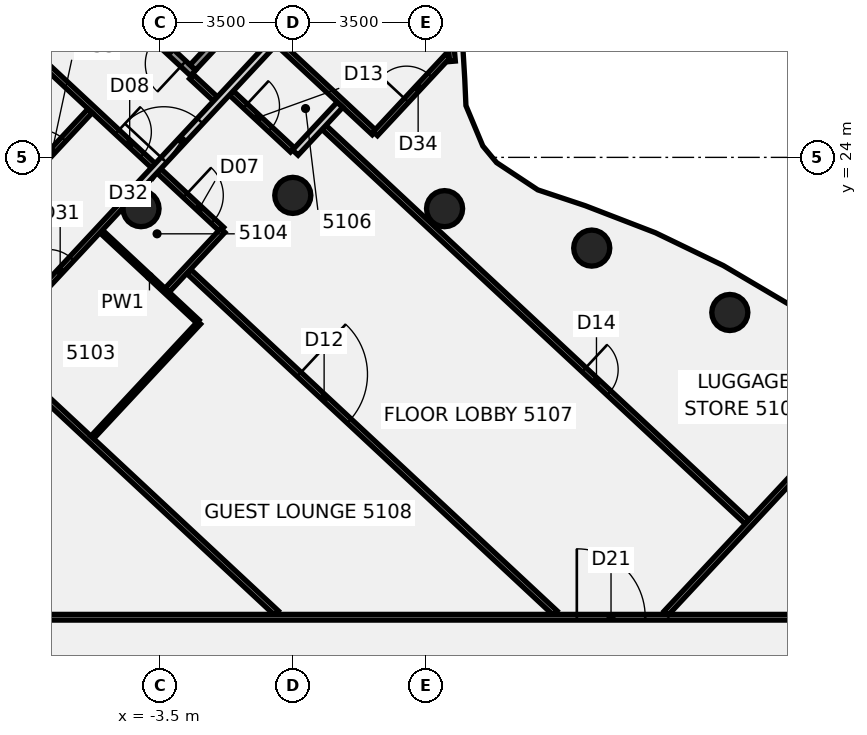
"""IFC4 building model, lengths in metres.
Left out: names, types, materials, properties, quantities, classifications, styles, units other than length and angle.
Written with IfcOpenShell. Run it as: python <this file> out.ifc"""

import sys

from ifc_helpers import new_model, si_unit, direction, frame, frame_2d, origin, origin_2d, place, context, subcontext, project, spatial, rectangle, circle, extrude, element, fill, save


model = new_model("IFC4")
c1 = context("Model", 3, precision=1e-05, world=origin(), true_north=direction((0.0, 1.0)))
c2 = subcontext(c1, "Body", "Model", "MODEL_VIEW")
j1 = project(units=[si_unit("LENGTHUNIT", "METRE"), si_unit("PLANEANGLEUNIT", "RADIAN")], contexts=[c1])
p1 = place(None, origin())
s1 = spatial("IfcSite", under=j1, at=p1, CompositionType="ELEMENT")
p2 = place(p1, origin())
s2 = spatial("IfcBuilding", under=s1, at=p2, CompositionType="ELEMENT")
p3 = place(p2, frame((0.0, 0.0, 204.1)))
s3 = spatial("IfcBuildingStorey", under=s2, at=p3, CompositionType="ELEMENT", Elevation=204.1)
for number, where, z_axis, x_axis in (
    (1, (11.5, 19.919, -0.14), (0.0, 0.0, 1.0), (1.0, 0.0, 0.0)),
    (2, (7.866, 21.613, -0.14), (0.0, 0.0, 1.0), (1.0, 0.0, 0.0)),
    (3, (3.994, 22.651, -0.14), (0.0, 0.0, 1.0), (1.0, 0.0, 0.0)),
    (4, (0.0, 23.0, -0.14), (0.0, 0.0, 1.0), (1.0, 0.0, 0.0)),
    (5, (-3.994, 22.651, -0.14), (0.0, 0.0, 1.0), (1.0, 0.0, 0.0)),
):
    element("IfcColumn", number, at=place(p3, frame(where, z_axis=z_axis, x_axis=x_axis)), inside=s3, PredefinedType="COLUMN", context=c2, shape_type="SweptSolid", body=[
        extrude(circle(Radius=0.475, at=origin_2d()), origin(), (0.0, 0.0, 1.0), 3.6),
    ])
p4 = place(p3, frame((-11.882, 22.685, 0.0), z_axis=(0.0, 0.0, 1.0), x_axis=(0.731545196646, -0.681792948969, 0.0)))
e6 = element("IfcWall", 6, at=p4, inside=s3, PredefinedType="PARTITIONING", context=c2, shape_type="SweptSolid", body=[
    extrude(rectangle(XDim=15.654, YDim=0.15, at=frame_2d((7.827, 0.0))), origin(), (0.0, 0.0, 1.0), 2.864),
])
p5 = place(p3, frame((-10.124, 29.794, 0.0), z_axis=(0.0, 0.0, 1.0), x_axis=(0.7316631589, -0.681666356738, 0.0)))
e7 = element("IfcWall", 7, at=p5, inside=s3, PredefinedType="PARTITIONING", context=c2, shape_type="SweptSolid", body=[
    extrude(rectangle(XDim=11.28, YDim=0.15, at=frame_2d((5.64, 0.0))), origin(), (0.0, 0.0, 1.0), 2.864),
])
p6 = place(p5, frame((9.97, 0.0, 0.0)))
e8 = element("IfcOpeningElement", 8, at=p6, cuts=e7, PredefinedType="OPENING", context=c2, shape_type="SweptSolid", body=[
    extrude(rectangle(XDim=1.0, YDim=2.1, at=frame_2d((0.5, 1.05))), frame((0.0, 0.085, 0.0), z_axis=(0.0, -1.0, 0.0), x_axis=(1.0, 0.0, 0.0)), (0.0, 0.0, 1.0), 0.17),
])
p7 = place(p5, frame((7.52, 0.0, 0.0)))
e9 = element("IfcOpeningElement", 9, at=p7, cuts=e7, PredefinedType="OPENING", context=c2, shape_type="SweptSolid", body=[
    extrude(rectangle(XDim=0.9, YDim=2.1, at=frame_2d((0.45, 1.05))), frame((0.0, 0.085, 0.0), z_axis=(0.0, -1.0, 0.0), x_axis=(1.0, 0.0, 0.0)), (0.0, 0.0, 1.0), 0.17),
])
p8 = place(p5, frame((0.82, 0.0, 0.0)))
e10 = element("IfcOpeningElement", 10, at=p8, cuts=e7, PredefinedType="OPENING", context=c2, shape_type="SweptSolid", body=[
    extrude(rectangle(XDim=0.9, YDim=2.1, at=frame_2d((0.45, 1.05))), frame((0.0, 0.085, 0.0), z_axis=(0.0, -1.0, 0.0), x_axis=(1.0, 0.0, 0.0)), (0.0, 0.0, 1.0), 0.17),
])
p9 = place(p3, frame((-2.664, 26.123, 0.0), z_axis=(0.0, 0.0, 1.0), x_axis=(0.731385767523, -0.68196397197, 0.0)))
e11 = element("IfcWall", 11, at=p9, inside=s3, PredefinedType="PARTITIONING", context=c2, shape_type="SweptSolid", body=[
    extrude(rectangle(XDim=0.86, YDim=0.15, at=frame_2d((0.43, 0.0))), origin(), (0.0, 0.0, 1.0), 2.864),
])
p10 = place(p3, frame((-5.043, 22.053, 0.0), z_axis=(0.0, 0.0, 1.0), x_axis=(0.731533911218, -0.681805057724, 0.0)))
e12 = element("IfcWall", 12, at=p10, inside=s3, PredefinedType="PARTITIONING", context=c2, shape_type="SweptSolid", body=[
    extrude(rectangle(XDim=3.476, YDim=0.1, at=frame_2d((1.738, 0.0))), origin(), (0.0, 0.0, 1.0), 2.864),
])
p11 = place(p3, frame((-2.739, 20.998, 0.0), z_axis=(0.0, 0.0, 1.0), x_axis=(0.731582971987, -0.681752414809, 0.0)))
e13 = element("IfcWall", 13, at=p11, inside=s3, PredefinedType="PARTITIONING", context=c2, shape_type="SweptSolid", body=[
    extrude(rectangle(XDim=13.179, YDim=0.15, at=frame_2d((6.59, 0.0))), origin(), (0.0, 0.0, 1.0), 2.864),
])
p12 = place(p11, frame((3.97, 0.0, 0.0)))
e14 = element("IfcOpeningElement", 14, at=p12, cuts=e13, PredefinedType="OPENING", context=c2, shape_type="SweptSolid", body=[
    extrude(rectangle(XDim=1.8, YDim=2.1, at=frame_2d((0.9, 1.05))), frame((0.0, 0.085, 0.0), z_axis=(0.0, -1.0, 0.0), x_axis=(1.0, 0.0, 0.0)), (0.0, 0.0, 1.0), 0.17),
])
p13 = place(p3, frame((-1.616, 25.693, 0.0), z_axis=(0.0, 0.0, 1.0), x_axis=(0.731635696516, -0.68169583216, 0.0)))
e15 = element("IfcWall", 15, at=p13, inside=s3, PredefinedType="PARTITIONING", context=c2, shape_type="SweptSolid", body=[
    extrude(rectangle(XDim=2.195, YDim=0.15, at=frame_2d((1.098, 0.0))), origin(), (0.0, 0.0, 1.0), 2.864),
])
p14 = place(p13, frame((0.5, 0.0, 0.0)))
e16 = element("IfcOpeningElement", 16, at=p14, cuts=e15, PredefinedType="OPENING", context=c2, shape_type="SweptSolid", body=[
    extrude(rectangle(XDim=0.9, YDim=2.1, at=frame_2d((0.45, 1.05))), frame((0.0, 0.085, 0.0), z_axis=(0.0, -1.0, 0.0), x_axis=(1.0, 0.0, 0.0)), (0.0, 0.0, 1.0), 0.17),
])
p15 = place(p3, frame((-0.389, 27.01, 0.0), z_axis=(0.0, 0.0, 1.0), x_axis=(0.731679144548, -0.681649198219, 0.0)))
e17 = element("IfcWall", 17, at=p15, inside=s3, PredefinedType="PARTITIONING", context=c2, shape_type="SweptSolid", body=[
    extrude(rectangle(XDim=3.46, YDim=0.15, at=frame_2d((1.73, 0.0))), origin(), (0.0, 0.0, 1.0), 2.864),
])
p16 = place(p3, frame((0.822, 24.789, 0.0), z_axis=(0.0, 0.0, 1.0), x_axis=(0.731510126667, -0.681830576158, 0.0)))
e18 = element("IfcWall", 18, at=p16, inside=s3, PredefinedType="PARTITIONING", context=c2, shape_type="SweptSolid", body=[
    extrude(rectangle(XDim=15.22, YDim=0.15, at=frame_2d((7.61, 0.0))), origin(), (0.0, 0.0, 1.0), 2.864),
])
p17 = place(p16, frame((9.35, 0.0, 0.0)))
e19 = element("IfcOpeningElement", 19, at=p17, cuts=e18, PredefinedType="OPENING", context=c2, shape_type="SweptSolid", body=[
    extrude(rectangle(XDim=0.9, YDim=2.1, at=frame_2d((0.45, 1.05))), frame((0.0, 0.085, 0.0), z_axis=(0.0, -1.0, 0.0), x_axis=(1.0, 0.0, 0.0)), (0.0, 0.0, 1.0), 0.17),
])
p18 = place(p3, frame((-17.065, 11.9, 0.0), z_axis=(0.0, 0.0, 1.0), x_axis=(1.0, 0.0, 0.0)))
e20 = element("IfcWall", 20, at=p18, inside=s3, PredefinedType="PARTITIONING", context=c2, shape_type="SweptSolid", body=[
    extrude(rectangle(XDim=34.165, YDim=0.15, at=frame_2d((17.083, 0.0))), origin(), (0.0, 0.0, 1.0), 2.864),
])
p19 = place(p18, frame((24.539, 0.0, 0.0)))
e21 = element("IfcOpeningElement", 21, at=p19, cuts=e20, PredefinedType="OPENING", context=c2, shape_type="SweptSolid", body=[
    extrude(rectangle(XDim=1.8, YDim=2.1, at=frame_2d((0.9, 1.05))), frame((0.0, 0.085, 0.0), z_axis=(0.0, -1.0, 0.0), x_axis=(1.0, 0.0, 0.0)), (0.0, 0.0, 1.0), 0.17),
])
p20 = place(p18, frame((8.831, 0.0, 0.0)))
e22 = element("IfcOpeningElement", 22, at=p20, cuts=e20, PredefinedType="OPENING", context=c2, shape_type="SweptSolid", body=[
    extrude(rectangle(XDim=1.8, YDim=2.1, at=frame_2d((0.9, 1.05))), frame((0.0, 0.085, 0.0), z_axis=(0.0, -1.0, 0.0), x_axis=(1.0, 0.0, 0.0)), (0.0, 0.0, 1.0), 0.17),
])
p21 = place(p18, frame((3.131, 0.0, 0.0)))
e23 = element("IfcOpeningElement", 23, at=p21, cuts=e20, PredefinedType="OPENING", context=c2, shape_type="SweptSolid", body=[
    extrude(rectangle(XDim=1.8, YDim=2.1, at=frame_2d((0.9, 1.05))), frame((0.0, 0.085, 0.0), z_axis=(0.0, -1.0, 0.0), x_axis=(1.0, 0.0, 0.0)), (0.0, 0.0, 1.0), 0.17),
])
p22 = place(p3, frame((-13.955, 25.8, 0.0), z_axis=(0.0, 0.0, 1.0), x_axis=(0.681742400868, 0.731592303717, 0.0)))
e24 = element("IfcWall", 24, at=p22, inside=s3, PredefinedType="PARTITIONING", context=c2, shape_type="SweptSolid", body=[
    extrude(rectangle(XDim=13.434, YDim=0.15, at=frame_2d((6.717, 0.0))), origin(), (0.0, 0.0, 1.0), 2.864),
])
p23 = place(p22, frame((5.835, 0.0, 0.0)))
e25 = element("IfcOpeningElement", 25, at=p23, cuts=e24, PredefinedType="OPENING", context=c2, shape_type="SweptSolid", body=[
    extrude(rectangle(XDim=1.8, YDim=2.1, at=frame_2d((0.9, 1.05))), frame((0.0, 0.085, 0.0), z_axis=(0.0, -1.0, 0.0), x_axis=(1.0, 0.0, 0.0)), (0.0, 0.0, 1.0), 0.17),
])
p24 = place(p3, frame((-7.907, 19.09, 0.0), z_axis=(0.0, 0.0, 1.0), x_axis=(0.681793812983, 0.731544391393, 0.0)))
e26 = element("IfcWall", 26, at=p24, inside=s3, PredefinedType="PARTITIONING", context=c2, shape_type="SweptSolid", body=[
    extrude(rectangle(XDim=5.094, YDim=0.15, at=frame_2d((2.547, 0.0))), origin(), (0.0, 0.0, 1.0), 2.864),
])
p25 = place(p24, frame((2.17, 0.0, 0.0)))
e27 = element("IfcOpeningElement", 27, at=p25, cuts=e26, PredefinedType="OPENING", context=c2, shape_type="SweptSolid", body=[
    extrude(rectangle(XDim=0.9, YDim=2.1, at=frame_2d((0.45, 1.05))), frame((0.0, 0.085, 0.0), z_axis=(0.0, -1.0, 0.0), x_axis=(1.0, 0.0, 0.0)), (0.0, 0.0, 1.0), 0.17),
])
p26 = place(p3, frame((-4.184, 23.085, 0.0), z_axis=(0.0, 0.0, 1.0), x_axis=(0.68178968738, 0.731548236402, 0.0)))
e28 = element("IfcWall", 28, at=p26, inside=s3, PredefinedType="PARTITIONING", context=c2, shape_type="SweptSolid", body=[
    extrude(rectangle(XDim=8.758, YDim=0.2, at=frame_2d((4.379, 0.0))), origin(), (0.0, 0.0, 1.0), 2.864),
])
p27 = place(p26, frame((1.159, 0.0, 0.0)))
e29 = element("IfcOpeningElement", 29, at=p27, cuts=e28, PredefinedType="OPENING", context=c2, shape_type="SweptSolid", body=[
    extrude(rectangle(XDim=1.4, YDim=2.1, at=frame_2d((0.7, 1.05))), frame((0.0, 0.11, 0.0), z_axis=(0.0, -1.0, 0.0), x_axis=(1.0, 0.0, 0.0)), (0.0, 0.0, 1.0), 0.22),
])
p28 = place(p3, frame((-7.053, 23.379, 0.0), z_axis=(0.0, 0.0, 1.0), x_axis=(0.68166548211, 0.731663973761, 0.0)))
e30 = element("IfcWall", 30, at=p28, inside=s3, PredefinedType="PARTITIONING", context=c2, shape_type="SweptSolid", body=[
    extrude(rectangle(XDim=2.52, YDim=0.15, at=frame_2d((1.26, 0.0))), origin(), (0.0, 0.0, 1.0), 2.864),
])
p29 = place(p28, frame((0.6, 0.0, 0.0)))
e31 = element("IfcOpeningElement", 31, at=p29, cuts=e30, PredefinedType="OPENING", context=c2, shape_type="SweptSolid", body=[
    extrude(rectangle(XDim=0.9, YDim=2.1, at=frame_2d((0.45, 1.05))), frame((0.0, 0.085, 0.0), z_axis=(0.0, -1.0, 0.0), x_axis=(1.0, 0.0, 0.0)), (0.0, 0.0, 1.0), 0.17),
])
p30 = place(p3, frame((-5.277, 16.632, 0.0), z_axis=(0.0, 0.0, 1.0), x_axis=(0.681902700844, 0.731442893589, 0.0)))
e32 = element("IfcWall", 32, at=p30, inside=s3, PredefinedType="PARTITIONING", context=c2, shape_type="SweptSolid", body=[
    extrude(rectangle(XDim=4.125, YDim=0.1, at=frame_2d((2.062, 0.0))), origin(), (0.0, 0.0, 1.0), 2.864),
])
p31 = place(p3, frame((2.173, 24.623, 0.0), z_axis=(0.0, 0.0, 1.0), x_axis=(0.681904871808, 0.731440869657, 0.0)))
e33 = element("IfcWall", 33, at=p31, inside=s3, PredefinedType="PARTITIONING", context=c2, shape_type="SweptSolid", body=[
    extrude(rectangle(XDim=2.799, YDim=0.15, at=frame_2d((1.4, 0.0))), origin(), (0.0, 0.0, 1.0), 2.864),
])
p32 = place(p31, frame((1.2, 0.0, 0.0)))
e34 = element("IfcOpeningElement", 34, at=p32, cuts=e33, PredefinedType="OPENING", context=c2, shape_type="SweptSolid", body=[
    extrude(rectangle(XDim=0.9, YDim=2.1, at=frame_2d((0.45, 1.05))), frame((0.0, 0.085, 0.0), z_axis=(0.0, -1.0, 0.0), x_axis=(1.0, 0.0, 0.0)), (0.0, 0.0, 1.0), 0.17),
])
p33 = place(p3, frame((-3.301, 20.511, 0.0), z_axis=(0.0, 0.0, 1.0), x_axis=(0.681683968941, 0.731646749797, 0.0)))
e35 = element("IfcWall", 35, at=p33, inside=s3, PredefinedType="PARTITIONING", context=c2, shape_type="SweptSolid", body=[
    extrude(rectangle(XDim=2.14, YDim=0.15, at=frame_2d((1.07, 0.0))), origin(), (0.0, 0.0, 1.0), 2.864),
])
p34 = place(p3, frame((0.066, 24.125, 0.0), z_axis=(0.0, 0.0, 1.0), x_axis=(0.681609901537, 0.731715752275, 0.0)))
e36 = element("IfcWall", 36, at=p34, inside=s3, PredefinedType="PARTITIONING", context=c2, shape_type="SweptSolid", body=[
    extrude(rectangle(XDim=1.72, YDim=0.2, at=frame_2d((0.86, 0.0))), origin(), (0.0, 0.0, 1.0), 2.864),
])
p35 = place(p3, frame((9.826, 12.01, 0.0), z_axis=(0.0, 0.0, 1.0), x_axis=(0.681799231756, 0.7315393411, 0.0)))
e37 = element("IfcWall", 37, at=p35, inside=s3, PredefinedType="PARTITIONING", context=c2, shape_type="SweptSolid", body=[
    extrude(rectangle(XDim=7.058, YDim=0.15, at=frame_2d((3.529, 0.0))), origin(), (0.0, 0.0, 1.0), 2.864),
])
p36 = place(p3, frame((4.202, 26.527, 0.0), z_axis=(0.0, 0.0, 1.0), x_axis=(-0.084944200643, 0.996385709842, 0.0)))
e38 = element("IfcWall", 38, at=p36, inside=s3, PredefinedType="PARTITIONING", context=c2, shape_type="SweptSolid", body=[
    extrude(rectangle(XDim=0.5, YDim=0.15, at=frame_2d((0.25, 0.0))), origin(), (0.0, 0.0, 1.0), 2.864),
])
p37 = place(p3, frame((-2.625, 26.224, -0.14), z_axis=(0.0, 0.0, 1.0), x_axis=(-0.731556739466, 0.681780563629, 0.0)))
e39 = element("IfcWall", 39, at=p37, inside=s3, PredefinedType="SHEAR", context=c2, shape_type="SweptSolid", body=[
    extrude(rectangle(XDim=6.7, YDim=0.2, at=frame_2d((3.35, 0.0))), origin(), (0.0, 0.0, 1.0), 3.004),
])
p38 = place(p37, frame((0.35, 0.0, 0.0)))
e40 = element("IfcOpeningElement", 40, at=p38, cuts=e39, PredefinedType="OPENING", context=c2, shape_type="SweptSolid", body=[
    extrude(rectangle(XDim=1.0, YDim=2.1, at=frame_2d((0.5, 1.05))), frame((0.0, 0.11, 0.0), z_axis=(0.0, -1.0, 0.0), x_axis=(1.0, 0.0, 0.0)), (0.0, 0.0, 1.0), 0.22),
])
p39 = place(p3, frame((-0.448, 28.706, -0.14), z_axis=(0.0, 0.0, 1.0), x_axis=(-0.681836962864, -0.731504173653, 0.0)))
e41 = element("IfcWall", 41, at=p39, inside=s3, PredefinedType="SHEAR", context=c2, shape_type="SweptSolid", body=[
    extrude(rectangle(XDim=3.2, YDim=0.2, at=frame_2d((1.6, 0.0))), origin(), (0.0, 0.0, 1.0), 3.004),
])
p40 = place(p6, frame((1.0, 0.0, 0.0), z_axis=(0.0, 0.0, 1.0), x_axis=(-1.0, 0.0, 0.0)))
e42 = element("IfcDoor", 42, at=p40, inside=s3, OperationType="SINGLE_SWING_RIGHT", PredefinedType="DOOR", context=c2, shape_type="SweptSolid", body=[
    extrude(rectangle(XDim=1.0, YDim=2.1, at=frame_2d((0.5, 1.05))), frame((0.0, 0.025, 0.0), z_axis=(0.0, -1.0, 0.0), x_axis=(1.0, 0.0, 0.0)), (0.0, 0.0, 1.0), 0.05),
])
fill(e8, e42)
p41 = place(p7, frame((0.9, 0.0, 0.0), z_axis=(0.0, 0.0, 1.0), x_axis=(-1.0, 0.0, 0.0)))
e43 = element("IfcDoor", 43, at=p41, inside=s3, OperationType="SINGLE_SWING_RIGHT", PredefinedType="DOOR", context=c2, shape_type="SweptSolid", body=[
    extrude(rectangle(XDim=0.9, YDim=2.1, at=frame_2d((0.45, 1.05))), frame((0.0, 0.025, 0.0), z_axis=(0.0, -1.0, 0.0), x_axis=(1.0, 0.0, 0.0)), (0.0, 0.0, 1.0), 0.05),
])
fill(e9, e43)
p42 = place(p12, frame((1.8, 0.0, 0.0), z_axis=(0.0, 0.0, 1.0), x_axis=(-1.0, 0.0, 0.0)))
e44 = element("IfcDoor", 44, at=p42, inside=s3, OperationType="DOUBLE_DOOR_SINGLE_SWING", PredefinedType="DOOR", context=c2, shape_type="SweptSolid", body=[
    extrude(rectangle(XDim=1.8, YDim=2.1, at=frame_2d((0.9, 1.05))), frame((0.0, 0.025, 0.0), z_axis=(0.0, -1.0, 0.0), x_axis=(1.0, 0.0, 0.0)), (0.0, 0.0, 1.0), 0.05),
])
fill(e14, e44)
p43 = place(p14, origin())
e45 = element("IfcDoor", 45, at=p43, inside=s3, OperationType="SINGLE_SWING_RIGHT", PredefinedType="DOOR", context=c2, shape_type="SweptSolid", body=[
    extrude(rectangle(XDim=0.9, YDim=2.1, at=frame_2d((0.45, 1.05))), frame((0.0, 0.025, 0.0), z_axis=(0.0, -1.0, 0.0), x_axis=(1.0, 0.0, 0.0)), (0.0, 0.0, 1.0), 0.05),
])
fill(e16, e45)
p44 = place(p17, origin())
e46 = element("IfcDoor", 46, at=p44, inside=s3, OperationType="SINGLE_SWING_LEFT", PredefinedType="DOOR", context=c2, shape_type="SweptSolid", body=[
    extrude(rectangle(XDim=0.9, YDim=2.1, at=frame_2d((0.45, 1.05))), frame((0.0, 0.025, 0.0), z_axis=(0.0, -1.0, 0.0), x_axis=(1.0, 0.0, 0.0)), (0.0, 0.0, 1.0), 0.05),
])
fill(e19, e46)
p45 = place(p19, frame((1.8, 0.0, 0.0), z_axis=(0.0, 0.0, 1.0), x_axis=(-1.0, 0.0, 0.0)))
e47 = element("IfcDoor", 47, at=p45, inside=s3, OperationType="DOUBLE_DOOR_SINGLE_SWING", PredefinedType="DOOR", context=c2, shape_type="SweptSolid", body=[
    extrude(rectangle(XDim=1.8, YDim=2.1, at=frame_2d((0.9, 1.05))), frame((0.0, 0.025, 0.0), z_axis=(0.0, -1.0, 0.0), x_axis=(1.0, 0.0, 0.0)), (0.0, 0.0, 1.0), 0.05),
])
fill(e21, e47)
p46 = place(p25, frame((0.9, 0.0, 0.0), z_axis=(0.0, 0.0, 1.0), x_axis=(-1.0, 0.0, 0.0)))
e48 = element("IfcDoor", 48, at=p46, inside=s3, OperationType="SINGLE_SWING_RIGHT", PredefinedType="DOOR", context=c2, shape_type="SweptSolid", body=[
    extrude(rectangle(XDim=0.9, YDim=2.1, at=frame_2d((0.45, 1.05))), frame((0.0, 0.025, 0.0), z_axis=(0.0, -1.0, 0.0), x_axis=(1.0, 0.0, 0.0)), (0.0, 0.0, 1.0), 0.05),
])
fill(e27, e48)
p47 = place(p27, frame((1.4, 0.0, 0.0), z_axis=(0.0, 0.0, 1.0), x_axis=(-1.0, 0.0, 0.0)))
e49 = element("IfcDoor", 49, at=p47, inside=s3, OperationType="DOUBLE_DOOR_SINGLE_SWING", PredefinedType="DOOR", context=c2, shape_type="SweptSolid", body=[
    extrude(rectangle(XDim=1.4, YDim=2.1, at=frame_2d((0.7, 1.05))), frame((0.0, 0.025, 0.0), z_axis=(0.0, -1.0, 0.0), x_axis=(1.0, 0.0, 0.0)), (0.0, 0.0, 1.0), 0.05),
])
fill(e29, e49)
p48 = place(p29, origin())
e50 = element("IfcDoor", 50, at=p48, inside=s3, OperationType="SINGLE_SWING_RIGHT", PredefinedType="DOOR", context=c2, shape_type="SweptSolid", body=[
    extrude(rectangle(XDim=0.9, YDim=2.1, at=frame_2d((0.45, 1.05))), frame((0.0, 0.025, 0.0), z_axis=(0.0, -1.0, 0.0), x_axis=(1.0, 0.0, 0.0)), (0.0, 0.0, 1.0), 0.05),
])
fill(e31, e50)
p49 = place(p32, origin())
e51 = element("IfcDoor", 51, at=p49, inside=s3, OperationType="SINGLE_SWING_LEFT", PredefinedType="DOOR", context=c2, shape_type="SweptSolid", body=[
    extrude(rectangle(XDim=0.9, YDim=2.1, at=frame_2d((0.45, 1.05))), frame((0.0, 0.025, 0.0), z_axis=(0.0, -1.0, 0.0), x_axis=(1.0, 0.0, 0.0)), (0.0, 0.0, 1.0), 0.05),
])
fill(e34, e51)
p50 = place(p38, origin())
e52 = element("IfcDoor", 52, at=p50, inside=s3, OperationType="SINGLE_SWING_LEFT", PredefinedType="DOOR", context=c2, shape_type="SweptSolid", body=[
    extrude(rectangle(XDim=1.0, YDim=2.1, at=frame_2d((0.5, 1.05))), frame((0.0, 0.025, 0.0), z_axis=(0.0, -1.0, 0.0), x_axis=(1.0, 0.0, 0.0)), (0.0, 0.0, 1.0), 0.05),
])
fill(e40, e52)
save(model, sys.argv[1])
